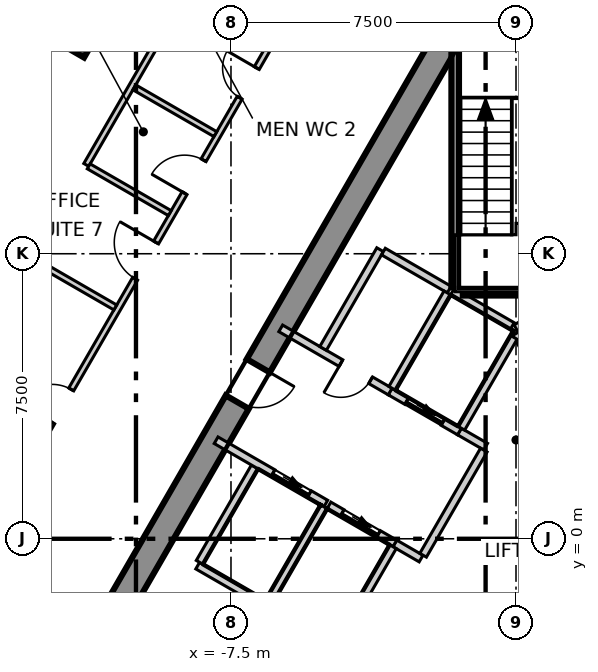
"""IFC4 building model, lengths in metres.
Left out: names, types, materials, properties, quantities, classifications, styles, units other than length and angle.
Written with IfcOpenShell. Run it as: python <this file> out.ifc"""

import sys

from ifc_helpers import new_model, si_unit, direction, frame, frame_2d, origin, origin_2d, place, context, subcontext, project, spatial, polyline, rectangle, outline, extrude, element, fill, save


model = new_model("IFC4")
c1 = context("Model", 3, precision=1e-05, world=origin(), true_north=direction((0.0, 1.0)))
c2 = subcontext(c1, "Body", "Model", "MODEL_VIEW")
j1 = project(units=[si_unit("LENGTHUNIT", "METRE"), si_unit("PLANEANGLEUNIT", "RADIAN")], contexts=[c1])
p1 = place(None, origin())
s1 = spatial("IfcSite", under=j1, at=p1, CompositionType="ELEMENT")
p2 = place(p1, origin())
s2 = spatial("IfcBuilding", under=s1, at=p2, CompositionType="ELEMENT")
p3 = place(p2, frame((0.0, 0.0, 239.3)))
s3 = spatial("IfcBuildingStorey", under=s2, at=p3, CompositionType="ELEMENT", Elevation=239.3)
p4 = place(p3, frame((-1.703, 13.35, -0.3), z_axis=(0.0, 0.0, 1.0), x_axis=(-0.500011533395, -0.866018744874, 0.0)))
e1 = element("IfcWall", 1, at=p4, inside=s3, PredefinedType="SHEAR", context=c2, shape_type="SweptSolid", body=[
    extrude(outline(polyline([(-0.202, -0.35), (1.782, -0.35), (3.766, -0.35), (5.75, -0.35), (7.734, -0.35), (9.718, -0.35), (11.702, -0.35), (13.686, -0.35), (15.67, -0.35), (17.654, -0.35), (19.638, -0.35), (21.622, -0.35), (21.218, 0.35), (19.307, 0.35), (17.397, 0.35), (15.486, 0.35), (13.576, 0.35), (11.665, 0.35), (9.755, 0.35), (7.844, 0.35), (5.934, 0.35), (4.023, 0.35), (2.113, 0.35), (0.202, 0.35), (-0.202, -0.35)])), origin(), (0.0, 0.0, 1.0), 4.0),
])
p5 = place(p4, frame((10.16, 0.0, 0.3)))
e2 = element("IfcOpeningElement", 2, at=p5, cuts=e1, PredefinedType="OPENING", context=c2, shape_type="SweptSolid", body=[
    extrude(rectangle(XDim=1.1, YDim=2.1, at=frame_2d((0.55, 1.05))), frame((0.0, 0.36, 0.0), z_axis=(0.0, -1.0, 0.0), x_axis=(1.0, 0.0, 0.0)), (0.0, 0.0, 1.0), 0.72),
])
p6 = place(p3, frame((-11.481, 13.363, -0.3), z_axis=(0.0, 0.0, 1.0), x_axis=(0.5, 0.866025403784, 0.0)))
e3 = element("IfcColumn", 3, at=p6, inside=s3, PredefinedType="COLUMN", context=c2, shape_type="SweptSolid", body=[
    extrude(rectangle(XDim=1.1, YDim=0.9, at=origin_2d()), origin(), (0.0, 0.0, 1.0), 4.0),
])
p7 = place(p3, frame((-2.687, 29.995, 0.0), z_axis=(0.0, 0.0, 1.0), x_axis=(-0.499992950893, -0.86602947355, 0.0)))
e4 = element("IfcWall", 4, at=p7, inside=s3, PredefinedType="ELEMENTEDWALL", context=c2, shape_type="SweptSolid", body=[
    extrude(rectangle(XDim=49.247, YDim=0.2, at=frame_2d((24.624, 0.0))), origin(), (0.0, 0.0, 1.0), 3.7),
])
p8 = place(p7, frame((2.119, 0.0, 0.9)))
e5 = element("IfcOpeningElement", 5, at=p8, cuts=e4, PredefinedType="OPENING", context=c2, shape_type="SweptSolid", body=[
    extrude(rectangle(XDim=4.2, YDim=2.5, at=frame_2d((2.1, 1.25))), frame((0.0, 0.11, 0.0), z_axis=(0.0, -1.0, 0.0), x_axis=(1.0, 0.0, 0.0)), (0.0, 0.0, 1.0), 0.22),
])
p9 = place(p7, frame((7.951, 0.0, 0.9)))
e6 = element("IfcOpeningElement", 6, at=p9, cuts=e4, PredefinedType="OPENING", context=c2, shape_type="SweptSolid", body=[
    extrude(rectangle(XDim=4.2, YDim=2.5, at=frame_2d((2.1, 1.25))), frame((0.0, 0.11, 0.0), z_axis=(0.0, -1.0, 0.0), x_axis=(1.0, 0.0, 0.0)), (0.0, 0.0, 1.0), 0.22),
])
p10 = place(p7, frame((13.784, 0.0, 0.9)))
e7 = element("IfcOpeningElement", 7, at=p10, cuts=e4, PredefinedType="OPENING", context=c2, shape_type="SweptSolid", body=[
    extrude(rectangle(XDim=4.2, YDim=2.5, at=frame_2d((2.1, 1.25))), frame((0.0, 0.11, 0.0), z_axis=(0.0, -1.0, 0.0), x_axis=(1.0, 0.0, 0.0)), (0.0, 0.0, 1.0), 0.22),
])
p11 = place(p7, frame((19.617, 0.0, 0.9)))
e8 = element("IfcOpeningElement", 8, at=p11, cuts=e4, PredefinedType="OPENING", context=c2, shape_type="SweptSolid", body=[
    extrude(rectangle(XDim=4.2, YDim=2.5, at=frame_2d((2.1, 1.25))), frame((0.0, 0.11, 0.0), z_axis=(0.0, -1.0, 0.0), x_axis=(1.0, 0.0, 0.0)), (0.0, 0.0, 1.0), 0.22),
])
p12 = place(p7, frame((25.449, 0.0, 0.9)))
e9 = element("IfcOpeningElement", 9, at=p12, cuts=e4, PredefinedType="OPENING", context=c2, shape_type="SweptSolid", body=[
    extrude(rectangle(XDim=4.2, YDim=2.5, at=frame_2d((2.1, 1.25))), frame((0.0, 0.11, 0.0), z_axis=(0.0, -1.0, 0.0), x_axis=(1.0, 0.0, 0.0)), (0.0, 0.0, 1.0), 0.22),
])
p13 = place(p7, frame((31.282, 0.0, 0.9)))
e10 = element("IfcOpeningElement", 10, at=p13, cuts=e4, PredefinedType="OPENING", context=c2, shape_type="SweptSolid", body=[
    extrude(rectangle(XDim=4.2, YDim=2.5, at=frame_2d((2.1, 1.25))), frame((0.0, 0.11, 0.0), z_axis=(0.0, -1.0, 0.0), x_axis=(1.0, 0.0, 0.0)), (0.0, 0.0, 1.0), 0.22),
])
p14 = place(p7, frame((37.115, 0.0, 0.9)))
e11 = element("IfcOpeningElement", 11, at=p14, cuts=e4, PredefinedType="OPENING", context=c2, shape_type="SweptSolid", body=[
    extrude(rectangle(XDim=4.2, YDim=2.5, at=frame_2d((2.1, 1.25))), frame((0.0, 0.11, 0.0), z_axis=(0.0, -1.0, 0.0), x_axis=(1.0, 0.0, 0.0)), (0.0, 0.0, 1.0), 0.22),
])
p15 = place(p7, frame((42.947, 0.0, 0.9)))
e12 = element("IfcOpeningElement", 12, at=p15, cuts=e4, PredefinedType="OPENING", context=c2, shape_type="SweptSolid", body=[
    extrude(rectangle(XDim=4.2, YDim=2.5, at=frame_2d((2.1, 1.25))), frame((0.0, 0.11, 0.0), z_axis=(0.0, -1.0, 0.0), x_axis=(1.0, 0.0, 0.0)), (0.0, 0.0, 1.0), 0.22),
])
p16 = place(p3, frame((-20.883, -11.97, 0.0), z_axis=(0.0, 0.0, 1.0), x_axis=(0.500006150555, 0.866021852731, 0.0)))
e13 = element("IfcWall", 13, at=p16, inside=s3, PredefinedType="PARTITIONING", context=c2, shape_type="SweptSolid", body=[
    extrude(rectangle(XDim=41.766, YDim=0.15, at=frame_2d((20.883, 0.0))), origin(), (0.0, 0.0, 1.0), 3.7),
])
p17 = place(p16, frame((36.616, 0.0, 0.0)))
e14 = element("IfcOpeningElement", 14, at=p17, cuts=e13, PredefinedType="OPENING", context=c2, shape_type="SweptSolid", body=[
    extrude(rectangle(XDim=1.1, YDim=2.1, at=frame_2d((0.55, 1.05))), frame((0.0, 0.085, 0.0), z_axis=(0.0, -1.0, 0.0), x_axis=(1.0, 0.0, 0.0)), (0.0, 0.0, 1.0), 0.17),
])
p18 = place(p16, frame((21.723, 0.0, 0.0)))
e15 = element("IfcOpeningElement", 15, at=p18, cuts=e13, PredefinedType="OPENING", context=c2, shape_type="SweptSolid", body=[
    extrude(rectangle(XDim=1.1, YDim=2.1, at=frame_2d((0.55, 1.05))), frame((0.0, 0.085, 0.0), z_axis=(0.0, -1.0, 0.0), x_axis=(1.0, 0.0, 0.0)), (0.0, 0.0, 1.0), 0.17),
])
p19 = place(p16, frame((30.423, 0.0, 0.0)))
e16 = element("IfcOpeningElement", 16, at=p19, cuts=e13, PredefinedType="OPENING", context=c2, shape_type="SweptSolid", body=[
    extrude(rectangle(XDim=0.9, YDim=2.1, at=frame_2d((0.45, 1.05))), frame((0.0, 0.085, 0.0), z_axis=(0.0, -1.0, 0.0), x_axis=(1.0, 0.0, 0.0)), (0.0, 0.0, 1.0), 0.17),
])
p20 = place(p16, frame((27.223, 0.0, 0.0)))
e17 = element("IfcOpeningElement", 17, at=p20, cuts=e13, PredefinedType="OPENING", context=c2, shape_type="SweptSolid", body=[
    extrude(rectangle(XDim=0.9, YDim=2.1, at=frame_2d((0.45, 1.05))), frame((0.0, 0.085, 0.0), z_axis=(0.0, -1.0, 0.0), x_axis=(1.0, 0.0, 0.0)), (0.0, 0.0, 1.0), 0.17),
])
p21 = place(p16, frame((24.323, 0.0, 0.0)))
e18 = element("IfcOpeningElement", 18, at=p21, cuts=e13, PredefinedType="OPENING", context=c2, shape_type="SweptSolid", body=[
    extrude(rectangle(XDim=1.0, YDim=2.1, at=frame_2d((0.5, 1.05))), frame((0.0, 0.085, 0.0), z_axis=(0.0, -1.0, 0.0), x_axis=(1.0, 0.0, 0.0)), (0.0, 0.0, 1.0), 0.17),
])
p22 = place(p16, frame((17.358, 0.0, 0.0)))
e19 = element("IfcOpeningElement", 19, at=p22, cuts=e13, PredefinedType="OPENING", context=c2, shape_type="SweptSolid", body=[
    extrude(rectangle(XDim=1.0, YDim=2.1, at=frame_2d((0.5, 1.05))), frame((0.0, 0.085, 0.0), z_axis=(0.0, -1.0, 0.0), x_axis=(1.0, 0.0, 0.0)), (0.0, 0.0, 1.0), 0.17),
])
p23 = place(p16, frame((6.825, 0.0, 0.0)))
e20 = element("IfcOpeningElement", 20, at=p23, cuts=e13, PredefinedType="OPENING", context=c2, shape_type="SweptSolid", body=[
    extrude(rectangle(XDim=1.1, YDim=2.1, at=frame_2d((0.55, 1.05))), frame((0.0, 0.085, 0.0), z_axis=(0.0, -1.0, 0.0), x_axis=(1.0, 0.0, 0.0)), (0.0, 0.0, 1.0), 0.17),
])
p24 = place(p3, frame((-14.934, 8.622, 0.0), z_axis=(0.0, 0.0, 1.0), x_axis=(0.86598187042, -0.500075394419, 0.0)))
e21 = element("IfcWall", 21, at=p24, inside=s3, PredefinedType="PARTITIONING", context=c2, shape_type="SweptSolid", body=[
    extrude(rectangle(XDim=5.07, YDim=0.15, at=frame_2d((2.535, 0.0))), origin(), (0.0, 0.0, 1.0), 3.2),
])
p25 = place(p3, frame((-11.308, 9.837, 0.0), z_axis=(0.0, 0.0, 1.0), x_axis=(0.499958218515, 0.866049524992, 0.0)))
e22 = element("IfcWall", 22, at=p25, inside=s3, PredefinedType="PARTITIONING", context=c2, shape_type="SweptSolid", body=[
    extrude(rectangle(XDim=8.725, YDim=0.15, at=frame_2d((4.362, 0.0))), origin(), (0.0, 0.0, 1.0), 3.7),
])
for number, where, z_axis, x_axis in (
    (23, (-11.244, 9.8, 0.0), (0.0, 0.0, 1.0), (0.866, -0.5, 0.0)),
    (24, (-10.044, 11.878, 0.0), (0.0, 0.0, 1.0), (0.866, -0.5, 0.0)),
):
    element("IfcWall", number, at=place(p3, frame(where, z_axis=z_axis, x_axis=x_axis)), inside=s3, PredefinedType="PARTITIONING", context=c2, shape_type="SweptSolid", body=[
        extrude(rectangle(XDim=2.463, YDim=0.15, at=frame_2d((1.231, 0.0))), origin(), (0.0, 0.0, 1.0), 3.7),
    ])
p26 = place(p3, frame((0.075, 24.07, 0.0), z_axis=(0.0, 0.0, 1.0), x_axis=(0.500006834213, -0.866021458014, 0.0)))
e25 = element("IfcWall", 25, at=p26, inside=s3, PredefinedType="PARTITIONING", context=c2, shape_type="SweptSolid", body=[
    extrude(rectangle(XDim=41.616, YDim=0.15, at=frame_2d((20.808, 0.0))), origin(), (0.0, 0.0, 1.0), 3.7),
])
p27 = place(p26, frame((36.616, 0.0, 0.0)))
e26 = element("IfcOpeningElement", 26, at=p27, cuts=e25, PredefinedType="OPENING", context=c2, shape_type="SweptSolid", body=[
    extrude(rectangle(XDim=1.1, YDim=2.1, at=frame_2d((0.55, 1.05))), frame((0.0, 0.085, 0.0), z_axis=(0.0, -1.0, 0.0), x_axis=(1.0, 0.0, 0.0)), (0.0, 0.0, 1.0), 0.17),
])
p28 = place(p26, frame((29.024, 0.0, 0.0)))
e27 = element("IfcOpeningElement", 27, at=p28, cuts=e25, PredefinedType="OPENING", context=c2, shape_type="SweptSolid", body=[
    extrude(rectangle(XDim=1.0, YDim=2.1, at=frame_2d((0.5, 1.05))), frame((0.0, 0.085, 0.0), z_axis=(0.0, -1.0, 0.0), x_axis=(1.0, 0.0, 0.0)), (0.0, 0.0, 1.0), 0.17),
])
p29 = place(p26, frame((23.19, 0.0, 0.0)))
e28 = element("IfcOpeningElement", 28, at=p29, cuts=e25, PredefinedType="OPENING", context=c2, shape_type="SweptSolid", body=[
    extrude(rectangle(XDim=1.0, YDim=2.1, at=frame_2d((0.5, 1.05))), frame((0.0, 0.085, 0.0), z_axis=(0.0, -1.0, 0.0), x_axis=(1.0, 0.0, 0.0)), (0.0, 0.0, 1.0), 0.17),
])
p30 = place(p26, frame((14.458, 0.0, 0.0)))
e29 = element("IfcOpeningElement", 29, at=p30, cuts=e25, PredefinedType="OPENING", context=c2, shape_type="SweptSolid", body=[
    extrude(rectangle(XDim=1.1, YDim=2.1, at=frame_2d((0.55, 1.05))), frame((0.0, 0.085, 0.0), z_axis=(0.0, -1.0, 0.0), x_axis=(1.0, 0.0, 0.0)), (0.0, 0.0, 1.0), 0.17),
])
p31 = place(p26, frame((3.993, 0.0, 0.0)))
e30 = element("IfcOpeningElement", 30, at=p31, cuts=e25, PredefinedType="OPENING", context=c2, shape_type="SweptSolid", body=[
    extrude(rectangle(XDim=1.1, YDim=2.1, at=frame_2d((0.55, 1.05))), frame((0.0, 0.085, 0.0), z_axis=(0.0, -1.0, 0.0), x_axis=(1.0, 0.0, 0.0)), (0.0, 0.0, 1.0), 0.17),
])
p32 = place(p3, frame((-8.376, -0.707, 0.0), z_axis=(0.0, 0.0, 1.0), x_axis=(0.866067520717, -0.499927044236, 0.0)))
e31 = element("IfcWall", 31, at=p32, inside=s3, PredefinedType="SOLIDWALL", context=c2, shape_type="SweptSolid", body=[
    extrude(rectangle(XDim=2.1, YDim=0.2, at=frame_2d((1.05, 0.0))), origin(), (0.0, 0.0, 1.0), 3.7),
])
p33 = place(p3, frame((-8.326, -0.62, 0.0), z_axis=(0.0, 0.0, 1.0), x_axis=(0.500023687443, 0.866011727401, 0.0)))
e32 = element("IfcWall", 32, at=p33, inside=s3, PredefinedType="SOLIDWALL", context=c2, shape_type="SweptSolid", body=[
    extrude(rectangle(XDim=2.9, YDim=0.2, at=frame_2d((1.45, 0.0))), origin(), (0.0, 0.0, 1.0), 3.7),
])
p34 = place(p3, frame((-0.002, 5.541, 0.0), z_axis=(0.0, 0.0, 1.0), x_axis=(0.86600155993, 0.500041296494, 0.0)))
e33 = element("IfcWall", 33, at=p34, inside=s3, PredefinedType="SOLIDWALL", context=c2, shape_type="SweptSolid", body=[
    extrude(rectangle(XDim=4.132, YDim=0.2, at=frame_2d((2.066, 0.0))), origin(), (0.0, 0.0, 1.0), 3.7),
])
p35 = place(p3, frame((0.0, 5.4, 0.0), z_axis=(0.0, 0.0, 1.0), x_axis=(0.500103862429, -0.865965430478, 0.0)))
e34 = element("IfcWall", 34, at=p35, inside=s3, PredefinedType="SOLIDWALL", context=c2, shape_type="SweptSolid", body=[
    extrude(rectangle(XDim=2.973, YDim=0.2, at=frame_2d((1.487, 0.0))), origin(), (0.0, 0.0, 1.0), 3.7),
])
p36 = place(p35, frame((0.937, 0.0, 0.0)))
e35 = element("IfcOpeningElement", 35, at=p36, cuts=e34, PredefinedType="OPENING", context=c2, shape_type="SweptSolid", body=[
    extrude(rectangle(XDim=1.1, YDim=2.1, at=frame_2d((0.55, 1.05))), frame((0.0, 0.11, 0.0), z_axis=(0.0, -1.0, 0.0), x_axis=(1.0, 0.0, 0.0)), (0.0, 0.0, 1.0), 0.22),
])
p37 = place(p3, frame((-7.891, 2.593, 0.0), z_axis=(0.0, 0.0, 1.0), x_axis=(0.866070917804, -0.499921159118, 0.0)))
e36 = element("IfcWall", 36, at=p37, inside=s3, PredefinedType="SOLIDWALL", context=c2, shape_type="SweptSolid", body=[
    extrude(rectangle(XDim=3.333, YDim=0.2, at=frame_2d((1.666, 0.0))), origin(), (0.0, 0.0, 1.0), 3.7),
])
p38 = place(p37, frame((1.73, 0.0, 0.0)))
e37 = element("IfcOpeningElement", 37, at=p38, cuts=e36, PredefinedType="OPENING", context=c2, shape_type="SweptSolid", body=[
    extrude(rectangle(XDim=1.1, YDim=2.1, at=frame_2d((0.55, 1.05))), frame((0.0, 0.11, 0.0), z_axis=(0.0, -1.0, 0.0), x_axis=(1.0, 0.0, 0.0)), (0.0, 0.0, 1.0), 0.22),
])
p39 = place(p3, frame((-3.188, -0.122, 0.0), z_axis=(0.0, 0.0, 1.0), x_axis=(0.865705793592, -0.50055317294, 0.0)))
e38 = element("IfcWall", 38, at=p39, inside=s3, PredefinedType="SOLIDWALL", context=c2, shape_type="SweptSolid", body=[
    extrude(rectangle(XDim=0.797, YDim=0.2, at=frame_2d((0.398, 0.0))), origin(), (0.0, 0.0, 1.0), 3.7),
])
p40 = place(p3, frame((-6.191, 5.537, 0.0), z_axis=(0.0, 0.0, 1.0), x_axis=(0.866052607023, -0.499952879648, 0.0)))
e39 = element("IfcWall", 39, at=p40, inside=s3, PredefinedType="SOLIDWALL", context=c2, shape_type="SweptSolid", body=[
    extrude(rectangle(XDim=3.332, YDim=0.2, at=frame_2d((1.666, 0.0))), origin(), (0.0, 0.0, 1.0), 3.7),
])
p41 = place(p40, frame((1.83, 0.0, 0.0)))
e40 = element("IfcOpeningElement", 40, at=p41, cuts=e39, PredefinedType="OPENING", context=c2, shape_type="SweptSolid", body=[
    extrude(rectangle(XDim=0.9, YDim=2.1, at=frame_2d((0.45, 1.05))), frame((0.0, 0.11, 0.0), z_axis=(0.0, -1.0, 0.0), x_axis=(1.0, 0.0, 0.0)), (0.0, 0.0, 1.0), 0.22),
])
p42 = place(p3, frame((-1.488, 2.822, 0.0), z_axis=(0.0, 0.0, 1.0), x_axis=(0.866236612152, -0.499633997809, 0.0)))
e41 = element("IfcWall", 41, at=p42, inside=s3, PredefinedType="SOLIDWALL", context=c2, shape_type="SweptSolid", body=[
    extrude(rectangle(XDim=0.796, YDim=0.2, at=frame_2d((0.398, 0.0))), origin(), (0.0, 0.0, 1.0), 3.7),
])
p43 = place(p3, frame((-5.076, 5.009, 0.0), z_axis=(0.0, 0.0, 1.0), x_axis=(0.50002537861, 0.866010750942, 0.0)))
e42 = element("IfcWall", 42, at=p43, inside=s3, PredefinedType="SOLIDWALL", context=c2, shape_type="SweptSolid", body=[
    extrude(rectangle(XDim=3.0, YDim=0.2, at=frame_2d((1.5, 0.0))), origin(), (0.0, 0.0, 1.0), 3.7),
])
p44 = place(p3, frame((-3.489, 7.557, 0.0), z_axis=(0.0, 0.0, 1.0), x_axis=(0.866010750942, -0.50002537861, 0.0)))
e43 = element("IfcWall", 43, at=p44, inside=s3, PredefinedType="SOLIDWALL", context=c2, shape_type="SweptSolid", body=[
    extrude(rectangle(XDim=2.0, YDim=0.2, at=frame_2d((1.0, 0.0))), origin(), (0.0, 0.0, 1.0), 3.7),
])
p45 = place(p3, frame((-2.444, -0.433, 0.0), z_axis=(0.0, 0.0, 1.0), x_axis=(0.500035624827, 0.866004834804, 0.0)))
e44 = element("IfcWall", 44, at=p45, inside=s3, PredefinedType="SOLIDWALL", context=c2, shape_type="SweptSolid", body=[
    extrude(rectangle(XDim=3.194, YDim=0.2, at=frame_2d((1.597, 0.0))), origin(), (0.0, 0.0, 1.0), 3.7),
])
p46 = place(p3, frame((-6.507, -1.67, 0.0), z_axis=(0.0, 0.0, 1.0), x_axis=(0.50012328804, 0.865954211699, 0.0)))
e45 = element("IfcWall", 45, at=p46, inside=s3, PredefinedType="SOLIDWALL", context=c2, shape_type="SweptSolid", body=[
    extrude(rectangle(XDim=2.9, YDim=0.2, at=frame_2d((1.45, 0.0))), origin(), (0.0, 0.0, 1.0), 3.7),
])
p47 = place(p3, frame((-4.922, 0.879, 0.0), z_axis=(0.0, 0.0, 1.0), x_axis=(0.866073918653, -0.499915960366, 0.0)))
e46 = element("IfcWall", 46, at=p47, inside=s3, PredefinedType="SOLIDWALL", context=c2, shape_type="SweptSolid", body=[
    extrude(rectangle(XDim=2.002, YDim=0.2, at=frame_2d((1.001, 0.0))), origin(), (0.0, 0.0, 1.0), 3.7),
])
p48 = place(p47, frame((0.402, 0.0, 0.0)))
e47 = element("IfcOpeningElement", 47, at=p48, cuts=e46, PredefinedType="OPENING", context=c2, shape_type="SweptSolid", body=[
    extrude(rectangle(XDim=1.1, YDim=2.1, at=frame_2d((0.55, 1.05))), frame((0.0, 0.11, 0.0), z_axis=(0.0, -1.0, 0.0), x_axis=(1.0, 0.0, 0.0)), (0.0, 0.0, 1.0), 0.22),
])
p49 = place(p3, frame((-4.619, -2.6, 0.0), z_axis=(0.0, 0.0, 1.0), x_axis=(0.50009492287, 0.865970593103, 0.0)))
e48 = element("IfcWall", 48, at=p49, inside=s3, PredefinedType="SOLIDWALL", context=c2, shape_type="SweptSolid", body=[
    extrude(rectangle(XDim=2.761, YDim=0.2, at=frame_2d((1.381, 0.0))), origin(), (0.0, 0.0, 1.0), 3.7),
])
p50 = place(p3, frame((-3.309, 3.873, 0.0), z_axis=(0.0, 0.0, 1.0), x_axis=(0.866098583652, -0.499873227325, 0.0)))
e49 = element("IfcWall", 49, at=p50, inside=s3, PredefinedType="SOLIDWALL", context=c2, shape_type="SweptSolid", body=[
    extrude(rectangle(XDim=2.103, YDim=0.2, at=frame_2d((1.051, 0.0))), origin(), (0.0, 0.0, 1.0), 3.7),
])
p51 = place(p50, frame((0.502, 0.0, 0.0)))
e50 = element("IfcOpeningElement", 50, at=p51, cuts=e49, PredefinedType="OPENING", context=c2, shape_type="SweptSolid", body=[
    extrude(rectangle(XDim=1.1, YDim=2.1, at=frame_2d((0.55, 1.05))), frame((0.0, 0.11, 0.0), z_axis=(0.0, -1.0, 0.0), x_axis=(1.0, 0.0, 0.0)), (0.0, 0.0, 1.0), 0.22),
])
p52 = place(p3, frame((-3.257, 3.959, 0.0), z_axis=(0.0, 0.0, 1.0), x_axis=(0.50012328804, 0.865954211699, 0.0)))
e51 = element("IfcWall", 51, at=p52, inside=s3, PredefinedType="SOLIDWALL", context=c2, shape_type="SweptSolid", body=[
    extrude(rectangle(XDim=2.9, YDim=0.2, at=frame_2d((1.45, 0.0))), origin(), (0.0, 0.0, 1.0), 3.7),
])
p53 = place(p3, frame((-1.67, 6.507, 0.0), z_axis=(0.0, 0.0, 1.0), x_axis=(0.865941441609, -0.500145398563, 0.0)))
e52 = element("IfcWall", 52, at=p53, inside=s3, PredefinedType="SOLIDWALL", context=c2, shape_type="SweptSolid", body=[
    extrude(rectangle(XDim=1.815, YDim=0.2, at=frame_2d((0.908, 0.0))), origin(), (0.0, 0.0, 1.0), 3.7),
])
p54 = place(p3, frame((-1.438, 2.909, 0.0), z_axis=(0.0, 0.0, 1.0), x_axis=(0.499829630636, 0.866123744241, 0.0)))
e53 = element("IfcWall", 53, at=p54, inside=s3, PredefinedType="SOLIDWALL", context=c2, shape_type="SweptSolid", body=[
    extrude(rectangle(XDim=2.761, YDim=0.2, at=frame_2d((1.38, 0.0))), origin(), (0.0, 0.0, 1.0), 3.7),
])
p55 = place(p3, frame((-1.4, 6.5, 0.0), z_axis=(0.0, 0.0, 1.0), x_axis=(1.0, 0.0, 0.0)))
e54 = element("IfcWall", 54, at=p55, inside=s3, PredefinedType="SOLIDWALL", context=c2, shape_type="SweptSolid", body=[
    extrude(rectangle(XDim=2.8, YDim=0.2, at=frame_2d((1.4, 0.0))), origin(), (0.0, 0.0, 1.0), 3.7),
])
p56 = place(p3, frame((-1.6, 6.615, 0.0), z_axis=(0.0, 0.0, 1.0), x_axis=(0.0, 1.0, 0.0)))
e55 = element("IfcWall", 55, at=p56, inside=s3, PredefinedType="SOLIDWALL", context=c2, shape_type="SweptSolid", body=[
    extrude(rectangle(XDim=6.715, YDim=0.2, at=frame_2d((3.357, 0.0))), origin(), (0.0, 0.0, 1.0), 3.7),
])
p57 = place(p48, origin())
e56 = element("IfcDoor", 56, at=p57, inside=s3, OperationType="SLIDING_TO_LEFT", PredefinedType="DOOR", context=c2, shape_type="SweptSolid", body=[
    extrude(rectangle(XDim=1.1, YDim=2.1, at=frame_2d((0.55, 1.05))), frame((0.0, 0.025, 0.0), z_axis=(0.0, -1.0, 0.0), x_axis=(1.0, 0.0, 0.0)), (0.0, 0.0, 1.0), 0.05),
])
fill(e47, e56)
p58 = place(p51, origin())
e57 = element("IfcDoor", 57, at=p58, inside=s3, OperationType="SLIDING_TO_LEFT", PredefinedType="DOOR", context=c2, shape_type="SweptSolid", body=[
    extrude(rectangle(XDim=1.1, YDim=2.1, at=frame_2d((0.55, 1.05))), frame((0.0, 0.025, 0.0), z_axis=(0.0, -1.0, 0.0), x_axis=(1.0, 0.0, 0.0)), (0.0, 0.0, 1.0), 0.05),
])
fill(e50, e57)
p59 = place(p38, origin())
e58 = element("IfcDoor", 58, at=p59, inside=s3, OperationType="SLIDING_TO_LEFT", PredefinedType="DOOR", context=c2, shape_type="SweptSolid", body=[
    extrude(rectangle(XDim=1.1, YDim=2.1, at=frame_2d((0.55, 1.05))), frame((0.0, 0.025, 0.0), z_axis=(0.0, -1.0, 0.0), x_axis=(1.0, 0.0, 0.0)), (0.0, 0.0, 1.0), 0.05),
])
fill(e37, e58)
p60 = place(p41, origin())
e59 = element("IfcDoor", 59, at=p60, inside=s3, OperationType="SINGLE_SWING_LEFT", PredefinedType="DOOR", context=c2, shape_type="SweptSolid", body=[
    extrude(rectangle(XDim=0.9, YDim=2.1, at=frame_2d((0.45, 1.05))), frame((0.0, 0.025, 0.0), z_axis=(0.0, -1.0, 0.0), x_axis=(1.0, 0.0, 0.0)), (0.0, 0.0, 1.0), 0.05),
])
fill(e40, e59)
p61 = place(p18, origin())
e60 = element("IfcDoor", 60, at=p61, inside=s3, OperationType="SINGLE_SWING_LEFT", PredefinedType="DOOR", context=c2, shape_type="SweptSolid", body=[
    extrude(rectangle(XDim=1.1, YDim=2.1, at=frame_2d((0.55, 1.05))), frame((0.0, 0.025, 0.0), z_axis=(0.0, -1.0, 0.0), x_axis=(1.0, 0.0, 0.0)), (0.0, 0.0, 1.0), 0.05),
])
fill(e15, e60)
p62 = place(p20, origin())
e61 = element("IfcDoor", 61, at=p62, inside=s3, OperationType="SINGLE_SWING_LEFT", PredefinedType="DOOR", context=c2, shape_type="SweptSolid", body=[
    extrude(rectangle(XDim=0.9, YDim=2.1, at=frame_2d((0.45, 1.05))), frame((0.0, 0.025, 0.0), z_axis=(0.0, -1.0, 0.0), x_axis=(1.0, 0.0, 0.0)), (0.0, 0.0, 1.0), 0.05),
])
fill(e17, e61)
p63 = place(p21, origin())
e62 = element("IfcDoor", 62, at=p63, inside=s3, OperationType="SINGLE_SWING_RIGHT", PredefinedType="DOOR", context=c2, shape_type="SweptSolid", body=[
    extrude(rectangle(XDim=1.0, YDim=2.1, at=frame_2d((0.5, 1.05))), frame((0.0, 0.025, 0.0), z_axis=(0.0, -1.0, 0.0), x_axis=(1.0, 0.0, 0.0)), (0.0, 0.0, 1.0), 0.05),
])
fill(e18, e62)
p64 = place(p22, origin())
e63 = element("IfcDoor", 63, at=p64, inside=s3, OperationType="SINGLE_SWING_RIGHT", PredefinedType="DOOR", context=c2, shape_type="SweptSolid", body=[
    extrude(rectangle(XDim=1.0, YDim=2.1, at=frame_2d((0.5, 1.05))), frame((0.0, 0.025, 0.0), z_axis=(0.0, -1.0, 0.0), x_axis=(1.0, 0.0, 0.0)), (0.0, 0.0, 1.0), 0.05),
])
fill(e19, e63)
p65 = place(p5, origin())
e64 = element("IfcDoor", 64, at=p65, inside=s3, OperationType="SINGLE_SWING_RIGHT", PredefinedType="DOOR", context=c2, shape_type="SweptSolid", body=[
    extrude(rectangle(XDim=1.1, YDim=2.1, at=frame_2d((0.55, 1.05))), frame((0.0, 0.025, 0.0), z_axis=(0.0, -1.0, 0.0), x_axis=(1.0, 0.0, 0.0)), (0.0, 0.0, 1.0), 0.05),
])
fill(e2, e64)
save(model, sys.argv[1])
